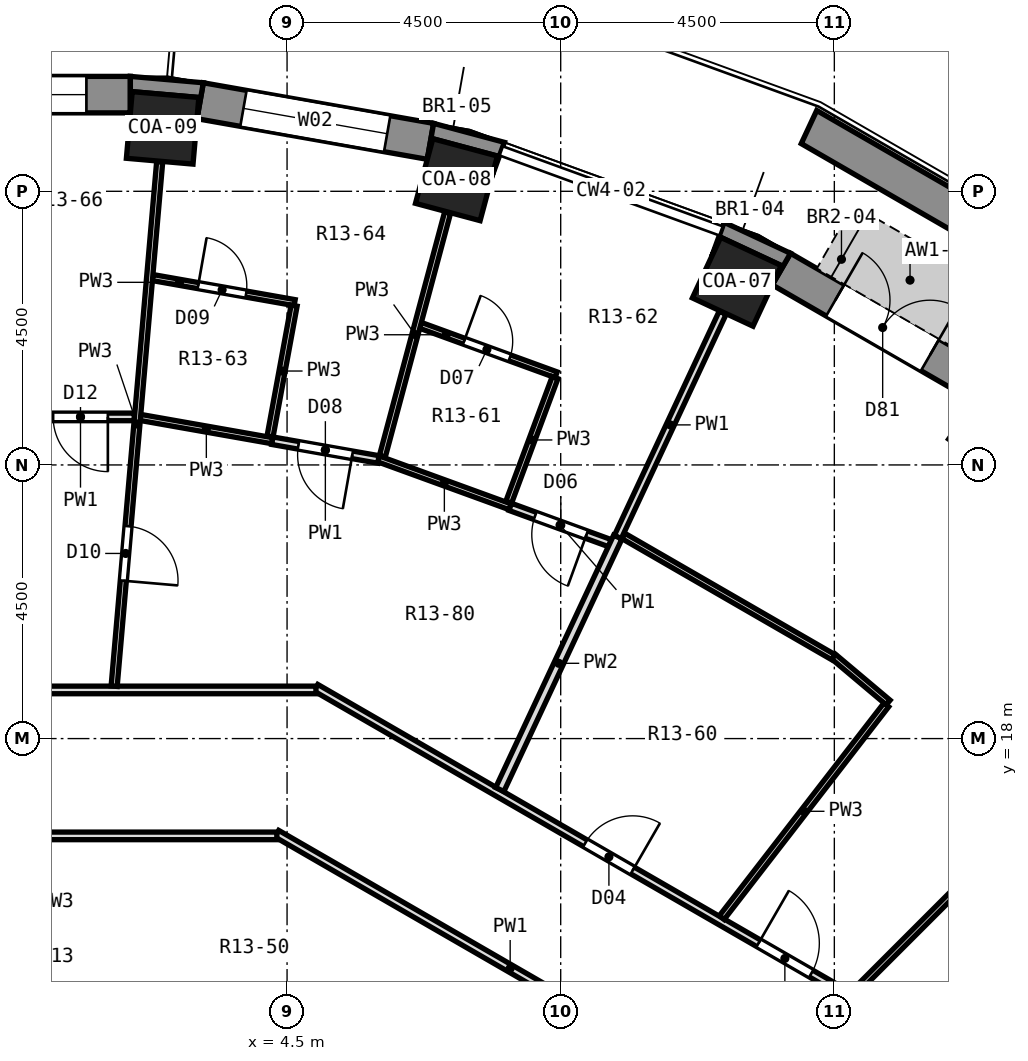
"""IFC4 building model, lengths in metres.
Left out: names, types, materials, properties, quantities, classifications, styles, units other than length and angle.
Written with IfcOpenShell. Run it as: python <this file> out.ifc"""

import sys

from ifc_helpers import new_model, si_unit, direction, frame, frame_2d, origin, origin_2d, place, context, subcontext, project, spatial, polyline, rectangle, outline, extrude, element, fill, save


model = new_model("IFC4")
c1 = context("Model", 3, precision=1e-05, world=origin(), true_north=direction((0.0, 1.0)))
c2 = subcontext(c1, "Body", "Model", "MODEL_VIEW")
j1 = project(units=[si_unit("LENGTHUNIT", "METRE"), si_unit("PLANEANGLEUNIT", "RADIAN")], contexts=[c1])
p1 = place(None, origin())
s1 = spatial("IfcSite", under=j1, at=p1, CompositionType="ELEMENT")
p2 = place(p1, origin())
s2 = spatial("IfcBuilding", under=s1, at=p2, CompositionType="ELEMENT")
p3 = place(p2, frame((0.0, 0.0, 65.9)))
s3 = spatial("IfcBuildingStorey", under=s2, at=p3, CompositionType="ELEMENT", Elevation=65.9)
for number, where, z_axis, x_axis in (
    (1, (16.146, 23.059, 0.0), (0.0, 0.0, 1.0), (0.574, 0.819, 0.0)),
    (2, (11.897, 25.512, 0.0), (0.0, 0.0, 1.0), (0.423, 0.906, 0.0)),
    (3, (7.286, 27.191, 0.0), (0.0, 0.0, 1.0), (0.259, 0.966, 0.0)),
    (4, (2.453, 28.043, 0.0), (0.0, 0.0, 1.0), (0.087, 0.996, 0.0)),
):
    element("IfcColumn", number, at=place(p3, frame(where, z_axis=z_axis, x_axis=x_axis)), inside=s3, PredefinedType="COLUMN", context=c2, shape_type="SweptSolid", body=[
        extrude(rectangle(XDim=1.1, YDim=1.1, at=origin_2d()), origin(), (0.0, 0.0, 1.0), 3.3),
    ])
p4 = place(p3, frame((15.96, 23.798, 0.0), z_axis=(0.0, 0.0, 1.0), x_axis=(-0.86603124159, 0.499989888488, 0.0)))
e5 = element("IfcWall", 5, at=p4, inside=s3, PredefinedType="SOLIDWALL", context=c2, shape_type="SweptSolid", body=[
    extrude(rectangle(XDim=3.846, YDim=0.6, at=frame_2d((1.923, 0.0))), origin(), (0.0, 0.0, 1.0), 2.75),
])
p5 = place(p4, frame((1.023, 0.0, 0.0)))
e6 = element("IfcOpeningElement", 6, at=p5, cuts=e5, PredefinedType="OPENING", context=c2, shape_type="SweptSolid", body=[
    extrude(rectangle(XDim=1.8, YDim=2.4, at=frame_2d((0.9, 1.2))), frame((0.0, 0.312, 0.0), z_axis=(0.0, -1.0, 0.0), x_axis=(1.0, 0.0, 0.0)), (0.0, 0.0, 1.0), 0.624),
])
p6 = place(p3, frame((6.858, 27.821, 0.0), z_axis=(0.0, 0.0, 1.0), x_axis=(-0.984800809218, 0.173687553279, 0.0)))
e7 = element("IfcWall", 7, at=p6, inside=s3, PredefinedType="SOLIDWALL", context=c2, shape_type="SweptSolid", body=[
    extrude(rectangle(XDim=3.846, YDim=0.6, at=frame_2d((1.923, 0.0))), origin(), (0.0, 0.0, 1.0), 2.75),
])
p7 = place(p6, frame((0.723, 0.0, 0.9)))
e8 = element("IfcOpeningElement", 8, at=p7, cuts=e7, PredefinedType="OPENING", context=c2, shape_type="SweptSolid", body=[
    extrude(rectangle(XDim=2.4, YDim=1.8, at=frame_2d((1.2, 0.9))), frame((0.0, 0.312, 0.0), z_axis=(0.0, -1.0, 0.0), x_axis=(1.0, 0.0, 0.0)), (0.0, 0.0, 1.0), 0.624),
])
p8 = place(p3, frame((1.923, 28.59, 0.0), z_axis=(0.0, 0.0, 1.0), x_axis=(-1.0, 0.0, 0.0)))
e9 = element("IfcWall", 9, at=p8, inside=s3, PredefinedType="SOLIDWALL", context=c2, shape_type="SweptSolid", body=[
    extrude(rectangle(XDim=3.846, YDim=0.6, at=frame_2d((1.923, 0.0))), origin(), (0.0, 0.0, 1.0), 2.75),
])
p9 = place(p8, frame((0.723, 0.0, 0.9)))
e10 = element("IfcOpeningElement", 10, at=p9, cuts=e9, PredefinedType="OPENING", context=c2, shape_type="SweptSolid", body=[
    extrude(rectangle(XDim=2.4, YDim=1.8, at=frame_2d((1.2, 0.9))), frame((0.0, 0.312, 0.0), z_axis=(0.0, -1.0, 0.0), x_axis=(1.0, 0.0, 0.0)), (0.0, 0.0, 1.0), 0.624),
])
p10 = place(p3, origin())
e11 = element("IfcWall", 11, at=p10, inside=s3, PredefinedType="SOLIDWALL", context=c2, shape_type="SweptSolid", body=[
    extrude(outline(polyline([(11.688, 26.49), (11.483, 25.926), (11.631, 26.243), (12.628, 25.779), (12.479, 25.461), (12.78, 25.981), (11.688, 26.49)])), origin(), (0.0, 0.0, 1.0), 2.75),
])
p11 = place(p3, origin())
e12 = element("IfcWall", 12, at=p11, inside=s3, PredefinedType="SOLIDWALL", context=c2, shape_type="SweptSolid", body=[
    extrude(outline(polyline([(6.91, 28.117), (6.806, 27.526), (6.897, 27.865), (7.959, 27.58), (7.869, 27.241), (8.074, 27.805), (6.91, 28.117)])), origin(), (0.0, 0.0, 1.0), 2.75),
])
p12 = place(p3, origin())
e13 = element("IfcWall", 13, at=p12, inside=s3, PredefinedType="SOLIDWALL", context=c2, shape_type="SweptSolid", body=[
    extrude(outline(polyline([(3.123, 28.785), (1.923, 28.89), (1.923, 28.29), (1.954, 28.639), (3.049, 28.543), (3.019, 28.194), (3.123, 28.785)])), origin(), (0.0, 0.0, 1.0), 2.75),
])
p13 = place(p3, origin())
e14 = element("IfcWall", 14, at=p13, inside=s3, PredefinedType="PARAPET", context=c2, shape_type="SweptSolid", body=[
    extrude(outline(polyline([(22.103, 22.103), (17.929, 25.605), (13.21, 28.33), (12.956, 27.784), (17.584, 25.112), (21.677, 21.677), (22.103, 22.103)])), origin(), (0.0, 0.0, 1.0), 0.5),
])
p14 = place(p3, frame((13.487, 19.349, 0.0), z_axis=(0.0, 0.0, 1.0), x_axis=(0.765126879229, -0.643879537399, 0.0)))
e15 = element("IfcWall", 15, at=p14, inside=s3, PredefinedType="PARTITIONING", context=c2, shape_type="SweptSolid", body=[
    extrude(rectangle(XDim=1.174, YDim=0.1, at=frame_2d((0.587, 0.0))), origin(), (0.0, 0.0, 1.0), 2.75),
])
p15 = place(p3, frame((4.332, 16.436, 0.0), z_axis=(0.0, 0.0, 1.0), x_axis=(0.866073188118, -0.499917225971, 0.0)))
e16 = element("IfcWall", 16, at=p15, inside=s3, PredefinedType="PARTITIONING", context=c2, shape_type="SweptSolid", body=[
    extrude(rectangle(XDim=8.861, YDim=0.125, at=frame_2d((4.431, 0.0))), origin(), (0.0, 0.0, 1.0), 2.75),
])
p16 = place(p3, frame((4.975, 18.836, 0.0), z_axis=(0.0, 0.0, 1.0), x_axis=(0.866059817553, -0.499940388867, 0.0)))
e17 = element("IfcWall", 17, at=p16, inside=s3, PredefinedType="PARTITIONING", context=c2, shape_type="SweptSolid", body=[
    extrude(rectangle(XDim=10.085, YDim=0.125, at=frame_2d((5.042, 0.0))), origin(), (0.0, 0.0, 1.0), 2.75),
])
p17 = place(p16, frame((8.405, 0.0, 0.0)))
e18 = element("IfcOpeningElement", 18, at=p17, cuts=e17, PredefinedType="OPENING", context=c2, shape_type="SweptSolid", body=[
    extrude(rectangle(XDim=1.0, YDim=2.1, at=frame_2d((0.5, 1.05))), frame((0.0, 0.074, 0.0), z_axis=(0.0, -1.0, 0.0), x_axis=(1.0, 0.0, 0.0)), (0.0, 0.0, 1.0), 0.149),
])
p18 = place(p16, frame((5.114, 0.0, 0.0)))
e19 = element("IfcOpeningElement", 19, at=p18, cuts=e17, PredefinedType="OPENING", context=c2, shape_type="SweptSolid", body=[
    extrude(rectangle(XDim=0.9, YDim=2.1, at=frame_2d((0.45, 1.05))), frame((0.0, 0.074, 0.0), z_axis=(0.0, -1.0, 0.0), x_axis=(1.0, 0.0, 0.0)), (0.0, 0.0, 1.0), 0.149),
])
p19 = place(p3, frame((10.03, 21.333, 0.0), z_axis=(0.0, 0.0, 1.0), x_axis=(0.866067260862, -0.499927494405, 0.0)))
e20 = element("IfcWall", 20, at=p19, inside=s3, PredefinedType="PARTITIONING", context=c2, shape_type="SweptSolid", body=[
    extrude(rectangle(XDim=3.985, YDim=0.1, at=frame_2d((1.993, 0.0))), origin(), (0.0, 0.0, 1.0), 2.75),
])
p20 = place(p3, frame((6.003, 22.599, 0.0), z_axis=(0.0, 0.0, 1.0), x_axis=(0.939700645731, -0.341998094165, 0.0)))
e21 = element("IfcWall", 21, at=p20, inside=s3, PredefinedType="PARTITIONING", context=c2, shape_type="SweptSolid", body=[
    extrude(rectangle(XDim=2.306, YDim=0.1, at=frame_2d((1.153, 0.0))), origin(), (0.0, 0.0, 1.0), 2.75),
])
p21 = place(p3, frame((8.17, 21.811, 0.0), z_axis=(0.0, 0.0, 1.0), x_axis=(0.939621739114, -0.342214826366, 0.0)))
e22 = element("IfcWall", 22, at=p21, inside=s3, PredefinedType="PARTITIONING", context=c2, shape_type="SweptSolid", body=[
    extrude(rectangle(XDim=1.745, YDim=0.125, at=frame_2d((0.873, 0.0))), origin(), (0.0, 0.0, 1.0), 2.75),
])
p22 = place(p21, frame((0.435, 0.0, 0.0)))
e23 = element("IfcOpeningElement", 23, at=p22, cuts=e22, PredefinedType="OPENING", context=c2, shape_type="SweptSolid", body=[
    extrude(rectangle(XDim=0.9, YDim=2.1, at=frame_2d((0.45, 1.05))), frame((0.0, 0.074, 0.0), z_axis=(0.0, -1.0, 0.0), x_axis=(1.0, 0.0, 0.0)), (0.0, 0.0, 1.0), 0.149),
])
p23 = place(p3, frame((6.695, 24.795, 0.0), z_axis=(0.0, 0.0, 1.0), x_axis=(0.939643152994, -0.342156024399, 0.0)))
e24 = element("IfcWall", 24, at=p23, inside=s3, PredefinedType="PARTITIONING", context=c2, shape_type="SweptSolid", body=[
    extrude(rectangle(XDim=2.373, YDim=0.1, at=frame_2d((1.187, 0.0))), origin(), (0.0, 0.0, 1.0), 2.75),
])
p24 = place(p23, frame((0.762, 0.0, 0.0)))
e25 = element("IfcOpeningElement", 25, at=p24, cuts=e24, PredefinedType="OPENING", context=c2, shape_type="SweptSolid", body=[
    extrude(rectangle(XDim=0.8, YDim=2.1, at=frame_2d((0.4, 1.05))), frame((0.0, 0.062, 0.0), z_axis=(0.0, -1.0, 0.0), x_axis=(1.0, 0.0, 0.0)), (0.0, 0.0, 1.0), 0.124),
])
p25 = place(p3, frame((2.087, 23.281, 0.0), z_axis=(0.0, 0.0, 1.0), x_axis=(0.984790246942, -0.173747430277, 0.0)))
e26 = element("IfcWall", 26, at=p25, inside=s3, PredefinedType="PARTITIONING", context=c2, shape_type="SweptSolid", body=[
    extrude(rectangle(XDim=2.205, YDim=0.1, at=frame_2d((1.102, 0.0))), origin(), (0.0, 0.0, 1.0), 2.75),
])
p26 = place(p3, frame((4.258, 22.898, 0.0), z_axis=(0.0, 0.0, 1.0), x_axis=(0.984787723486, -0.173761732473, 0.0)))
e27 = element("IfcWall", 27, at=p26, inside=s3, PredefinedType="PARTITIONING", context=c2, shape_type="SweptSolid", body=[
    extrude(rectangle(XDim=1.77, YDim=0.125, at=frame_2d((0.885, 0.0))), origin(), (0.0, 0.0, 1.0), 2.75),
])
p27 = place(p26, frame((0.435, 0.0, 0.0)))
e28 = element("IfcOpeningElement", 28, at=p27, cuts=e27, PredefinedType="OPENING", context=c2, shape_type="SweptSolid", body=[
    extrude(rectangle(XDim=0.9, YDim=2.1, at=frame_2d((0.45, 1.05))), frame((0.0, 0.074, 0.0), z_axis=(0.0, -1.0, 0.0), x_axis=(1.0, 0.0, 0.0)), (0.0, 0.0, 1.0), 0.149),
])
p28 = place(p3, frame((2.289, 25.581, 0.0), z_axis=(0.0, 0.0, 1.0), x_axis=(0.984780450856, -0.173802944775, 0.0)))
e29 = element("IfcWall", 29, at=p28, inside=s3, PredefinedType="PARTITIONING", context=c2, shape_type="SweptSolid", body=[
    extrude(rectangle(XDim=2.373, YDim=0.1, at=frame_2d((1.186, 0.0))), origin(), (0.0, 0.0, 1.0), 2.75),
])
p29 = place(p28, frame((0.761, 0.0, 0.0)))
e30 = element("IfcOpeningElement", 30, at=p29, cuts=e29, PredefinedType="OPENING", context=c2, shape_type="SweptSolid", body=[
    extrude(rectangle(XDim=0.8, YDim=2.1, at=frame_2d((0.4, 1.05))), frame((0.0, 0.062, 0.0), z_axis=(0.0, -1.0, 0.0), x_axis=(1.0, 0.0, 0.0)), (0.0, 0.0, 1.0), 0.124),
])
p30 = place(p3, frame((-4.466, 16.4, 0.0), z_axis=(0.0, 0.0, 1.0), x_axis=(1.0, 0.0, 0.0)))
e31 = element("IfcWall", 31, at=p30, inside=s3, PredefinedType="PARTITIONING", context=c2, shape_type="SweptSolid", body=[
    extrude(rectangle(XDim=8.798, YDim=0.125, at=frame_2d((4.399, 0.0))), origin(), (0.0, 0.0, 1.0), 2.75),
])
p31 = place(p3, frame((-5.109, 18.8, 0.0), z_axis=(0.0, 0.0, 1.0), x_axis=(1.0, 0.0, 0.0)))
e32 = element("IfcWall", 32, at=p31, inside=s3, PredefinedType="PARTITIONING", context=c2, shape_type="SweptSolid", body=[
    extrude(rectangle(XDim=10.084, YDim=0.125, at=frame_2d((5.042, 0.0))), origin(), (0.0, 0.0, 1.0), 2.75),
])
p32 = place(p3, frame((0.218, 23.29, 0.0), z_axis=(0.0, 0.0, 1.0), x_axis=(1.0, 0.0, 0.0)))
e33 = element("IfcWall", 33, at=p32, inside=s3, PredefinedType="PARTITIONING", context=c2, shape_type="SweptSolid", body=[
    extrude(rectangle(XDim=1.77, YDim=0.125, at=frame_2d((0.885, 0.0))), origin(), (0.0, 0.0, 1.0), 2.75),
])
p33 = place(p32, frame((0.435, 0.0, 0.0)))
e34 = element("IfcOpeningElement", 34, at=p33, cuts=e33, PredefinedType="OPENING", context=c2, shape_type="SweptSolid", body=[
    extrude(rectangle(XDim=0.9, YDim=2.1, at=frame_2d((0.45, 1.05))), frame((0.0, 0.074, 0.0), z_axis=(0.0, -1.0, 0.0), x_axis=(1.0, 0.0, 0.0)), (0.0, 0.0, 1.0), 0.149),
])
p34 = place(p3, frame((13.807, 13.807, 0.0), z_axis=(0.0, 0.0, 1.0), x_axis=(0.707106781187, 0.707106781187, 0.0)))
e35 = element("IfcWall", 35, at=p34, inside=s3, PredefinedType="PARTITIONING", context=c2, shape_type="SweptSolid", body=[
    extrude(rectangle(XDim=8.064, YDim=0.1, at=frame_2d((4.032, 0.0))), origin(), (0.0, 0.0, 1.0), 2.75),
])
p35 = place(p3, frame((11.648, 15.055, 0.0), z_axis=(0.0, 0.0, 1.0), x_axis=(0.611909290422, 0.790927948865, 0.0)))
e36 = element("IfcWall", 36, at=p35, inside=s3, PredefinedType="PARTITIONING", context=c2, shape_type="SweptSolid", body=[
    extrude(rectangle(XDim=4.423, YDim=0.1, at=frame_2d((2.211, 0.0))), origin(), (0.0, 0.0, 1.0), 2.75),
])
p36 = place(p3, frame((9.938, 21.313, 0.0), z_axis=(0.0, 0.0, 1.0), x_axis=(0.42349236443, 0.90589967285, 0.0)))
e37 = element("IfcWall", 37, at=p36, inside=s3, PredefinedType="PARTITIONING", context=c2, shape_type="SweptSolid", body=[
    extrude(rectangle(XDim=4.073, YDim=0.125, at=frame_2d((2.037, 0.0))), origin(), (0.0, 0.0, 1.0), 2.75),
])
p37 = place(p3, frame((7.998, 17.163, 0.0), z_axis=(0.0, 0.0, 1.0), x_axis=(0.423462967361, 0.905913414888, 0.0)))
e38 = element("IfcWall", 38, at=p37, inside=s3, PredefinedType="PARTITIONING", context=c2, shape_type="SweptSolid", body=[
    extrude(rectangle(XDim=4.582, YDim=0.15, at=frame_2d((2.291, 0.0))), origin(), (0.0, 0.0, 1.0), 2.75),
])
p38 = place(p3, frame((8.145, 21.886, 0.0), z_axis=(0.0, 0.0, 1.0), x_axis=(0.348761078078, 0.937211667884, 0.0)))
e39 = element("IfcWall", 39, at=p38, inside=s3, PredefinedType="PARTITIONING", context=c2, shape_type="SweptSolid", body=[
    extrude(rectangle(XDim=2.187, YDim=0.1, at=frame_2d((1.093, 0.0))), origin(), (0.0, 0.0, 1.0), 2.75),
])
p39 = place(p3, frame((6.067, 22.642, 0.0), z_axis=(0.0, 0.0, 1.0), x_axis=(0.258618430752, 0.965979558415, 0.0)))
e40 = element("IfcWall", 40, at=p39, inside=s3, PredefinedType="PARTITIONING", context=c2, shape_type="SweptSolid", body=[
    extrude(rectangle(XDim=4.149, YDim=0.1, at=frame_2d((2.074, 0.0))), origin(), (0.0, 0.0, 1.0), 2.75),
])
p40 = place(p3, frame((4.22, 22.969, 0.0), z_axis=(0.0, 0.0, 1.0), x_axis=(0.180918125104, 0.983498160653, 0.0)))
e41 = element("IfcWall", 41, at=p40, inside=s3, PredefinedType="PARTITIONING", context=c2, shape_type="SweptSolid", body=[
    extrude(rectangle(XDim=2.188, YDim=0.1, at=frame_2d((1.094, 0.0))), origin(), (0.0, 0.0, 1.0), 2.75),
])
p41 = place(p3, frame((1.656, 18.862, 0.0), z_axis=(0.0, 0.0, 1.0), x_axis=(0.086481121159, 0.996253489672, 0.0)))
e42 = element("IfcWall", 42, at=p41, inside=s3, PredefinedType="PARTITIONING", context=c2, shape_type="SweptSolid", body=[
    extrude(rectangle(XDim=8.656, YDim=0.1, at=frame_2d((4.328, 0.0))), origin(), (0.0, 0.0, 1.0), 2.75),
])
p42 = place(p41, frame((1.741, 0.0, 0.0)))
e43 = element("IfcOpeningElement", 43, at=p42, cuts=e42, PredefinedType="OPENING", context=c2, shape_type="SweptSolid", body=[
    extrude(rectangle(XDim=0.9, YDim=2.1, at=frame_2d((0.45, 1.05))), frame((0.0, 0.062, 0.0), z_axis=(0.0, -1.0, 0.0), x_axis=(1.0, 0.0, 0.0)), (0.0, 0.0, 1.0), 0.124),
])
p43 = place(p5, frame((1.8, 0.0, 0.0), z_axis=(0.0, 0.0, 1.0), x_axis=(-1.0, 0.0, 0.0)))
e44 = element("IfcDoor", 44, at=p43, inside=s3, OperationType="DOUBLE_DOOR_SINGLE_SWING", PredefinedType="DOOR", context=c2, shape_type="SweptSolid", body=[
    extrude(rectangle(XDim=1.8, YDim=2.4, at=frame_2d((0.9, 1.2))), frame((0.0, -0.075, 0.0), z_axis=(0.0, -1.0, 0.0), x_axis=(1.0, 0.0, 0.0)), (0.0, 0.0, 1.0), 0.05),
])
fill(e6, e44)
p44 = place(p7, origin())
e45 = element("IfcWindow", 45, at=p44, inside=s3, PartitioningType="SINGLE_PANEL", PredefinedType="WINDOW", context=c2, shape_type="SweptSolid", body=[
    extrude(rectangle(XDim=2.4, YDim=1.8, at=frame_2d((1.2, 0.9))), frame((0.0, 0.18, 0.0), z_axis=(0.0, -1.0, 0.0), x_axis=(1.0, 0.0, 0.0)), (0.0, 0.0, 1.0), 0.06),
])
fill(e8, e45)
p45 = place(p9, origin())
e46 = element("IfcWindow", 46, at=p45, inside=s3, PartitioningType="SINGLE_PANEL", PredefinedType="WINDOW", context=c2, shape_type="SweptSolid", body=[
    extrude(rectangle(XDim=2.4, YDim=1.8, at=frame_2d((1.2, 0.9))), frame((0.0, 0.18, 0.0), z_axis=(0.0, -1.0, 0.0), x_axis=(1.0, 0.0, 0.0)), (0.0, 0.0, 1.0), 0.06),
])
fill(e10, e46)
p46 = place(p17, origin())
e47 = element("IfcDoor", 47, at=p46, inside=s3, OperationType="SINGLE_SWING_LEFT", PredefinedType="DOOR", context=c2, shape_type="SweptSolid", body=[
    extrude(rectangle(XDim=1.0, YDim=2.1, at=frame_2d((0.5, 1.05))), frame((0.0, 0.025, 0.0), z_axis=(0.0, -1.0, 0.0), x_axis=(1.0, 0.0, 0.0)), (0.0, 0.0, 1.0), 0.05),
])
fill(e18, e47)
p47 = place(p18, origin())
e48 = element("IfcDoor", 48, at=p47, inside=s3, OperationType="SINGLE_SWING_RIGHT", PredefinedType="DOOR", context=c2, shape_type="SweptSolid", body=[
    extrude(rectangle(XDim=0.9, YDim=2.1, at=frame_2d((0.45, 1.05))), frame((0.0, 0.025, 0.0), z_axis=(0.0, -1.0, 0.0), x_axis=(1.0, 0.0, 0.0)), (0.0, 0.0, 1.0), 0.05),
])
fill(e19, e48)
p48 = place(p22, frame((0.9, 0.0, 0.0), z_axis=(0.0, 0.0, 1.0), x_axis=(-1.0, 0.0, 0.0)))
e49 = element("IfcDoor", 49, at=p48, inside=s3, OperationType="SINGLE_SWING_LEFT", PredefinedType="DOOR", context=c2, shape_type="SweptSolid", body=[
    extrude(rectangle(XDim=0.9, YDim=2.1, at=frame_2d((0.45, 1.05))), frame((0.0, 0.025, 0.0), z_axis=(0.0, -1.0, 0.0), x_axis=(1.0, 0.0, 0.0)), (0.0, 0.0, 1.0), 0.05),
])
fill(e23, e49)
p49 = place(p24, origin())
e50 = element("IfcDoor", 50, at=p49, inside=s3, OperationType="SINGLE_SWING_LEFT", PredefinedType="DOOR", context=c2, shape_type="SweptSolid", body=[
    extrude(rectangle(XDim=0.8, YDim=2.1, at=frame_2d((0.4, 1.05))), frame((0.0, 0.025, 0.0), z_axis=(0.0, -1.0, 0.0), x_axis=(1.0, 0.0, 0.0)), (0.0, 0.0, 1.0), 0.05),
])
fill(e25, e50)
p50 = place(p27, frame((0.9, 0.0, 0.0), z_axis=(0.0, 0.0, 1.0), x_axis=(-1.0, 0.0, 0.0)))
e51 = element("IfcDoor", 51, at=p50, inside=s3, OperationType="SINGLE_SWING_LEFT", PredefinedType="DOOR", context=c2, shape_type="SweptSolid", body=[
    extrude(rectangle(XDim=0.9, YDim=2.1, at=frame_2d((0.45, 1.05))), frame((0.0, 0.025, 0.0), z_axis=(0.0, -1.0, 0.0), x_axis=(1.0, 0.0, 0.0)), (0.0, 0.0, 1.0), 0.05),
])
fill(e28, e51)
p51 = place(p29, origin())
e52 = element("IfcDoor", 52, at=p51, inside=s3, OperationType="SINGLE_SWING_LEFT", PredefinedType="DOOR", context=c2, shape_type="SweptSolid", body=[
    extrude(rectangle(XDim=0.8, YDim=2.1, at=frame_2d((0.4, 1.05))), frame((0.0, 0.025, 0.0), z_axis=(0.0, -1.0, 0.0), x_axis=(1.0, 0.0, 0.0)), (0.0, 0.0, 1.0), 0.05),
])
fill(e30, e52)
p52 = place(p42, frame((0.9, 0.0, 0.0), z_axis=(0.0, 0.0, 1.0), x_axis=(-1.0, 0.0, 0.0)))
e53 = element("IfcDoor", 53, at=p52, inside=s3, OperationType="SINGLE_SWING_RIGHT", PredefinedType="DOOR", context=c2, shape_type="SweptSolid", body=[
    extrude(rectangle(XDim=0.9, YDim=2.1, at=frame_2d((0.45, 1.05))), frame((0.0, 0.025, 0.0), z_axis=(0.0, -1.0, 0.0), x_axis=(1.0, 0.0, 0.0)), (0.0, 0.0, 1.0), 0.05),
])
fill(e43, e53)
p53 = place(p33, frame((0.9, 0.0, 0.0), z_axis=(0.0, 0.0, 1.0), x_axis=(-1.0, 0.0, 0.0)))
e54 = element("IfcDoor", 54, at=p53, inside=s3, OperationType="SINGLE_SWING_LEFT", PredefinedType="DOOR", context=c2, shape_type="SweptSolid", body=[
    extrude(rectangle(XDim=0.9, YDim=2.1, at=frame_2d((0.45, 1.05))), frame((0.0, 0.025, 0.0), z_axis=(0.0, -1.0, 0.0), x_axis=(1.0, 0.0, 0.0)), (0.0, 0.0, 1.0), 0.05),
])
fill(e34, e54)
save(model, sys.argv[1])
